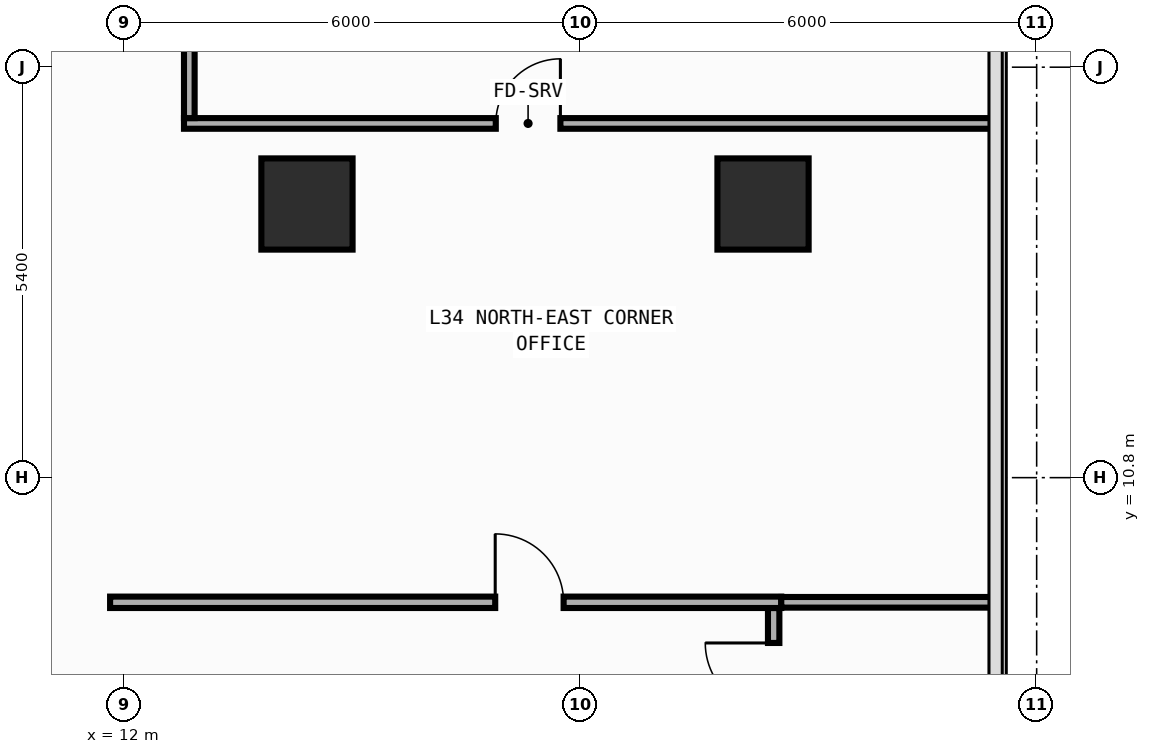
"""IFC4 building model, lengths in metres.
Left out: names, types, materials, properties, quantities, classifications, styles, units other than length and angle.
Written with IfcOpenShell. Run it as: python <this file> out.ifc"""

import sys

from ifc_helpers import new_model, si_unit, direction, frame, frame_2d, origin, origin_2d, place, context, subcontext, project, spatial, rectangle, extrude, element, fill, save


model = new_model("IFC4")
c1 = context("Model", 3, precision=1e-05, world=origin(), true_north=direction((0.0, 1.0)))
c2 = subcontext(c1, "Body", "Model", "MODEL_VIEW")
j1 = project(units=[si_unit("LENGTHUNIT", "METRE"), si_unit("PLANEANGLEUNIT", "RADIAN")], contexts=[c1])
p1 = place(None, origin())
s1 = spatial("IfcSite", under=j1, at=p1, CompositionType="ELEMENT")
p2 = place(p1, origin())
s2 = spatial("IfcBuilding", under=s1, at=p2, CompositionType="ELEMENT")
p3 = place(p2, frame((0.0, 0.0, 147.8)))
s3 = spatial("IfcBuildingStorey", under=s2, at=p3, CompositionType="ELEMENT", Elevation=147.8)
for number, where, z_axis, x_axis in (
    (1, (20.4, 14.4, 0.0), (0.0, 0.0, 1.0), (1.0, 0.0, 0.0)),
    (2, (14.4, 14.4, 0.0), (0.0, 0.0, 1.0), (1.0, 0.0, 0.0)),
):
    element("IfcColumn", number, at=place(p3, frame(where, z_axis=z_axis, x_axis=x_axis)), inside=s3, PredefinedType="COLUMN", context=c2, shape_type="SweptSolid", body=[
        extrude(rectangle(XDim=1.2, YDim=1.2, at=origin_2d()), origin(), (0.0, 0.0, 1.0), 4.2),
    ])
p4 = place(p3, frame((20.54, 7.06, 0.0), z_axis=(0.0, 0.0, 1.0), x_axis=(0.0, 1.0, 0.0)))
e3 = element("IfcWall", 3, at=p4, inside=s3, PredefinedType="PARTITIONING", context=c2, shape_type="SweptSolid", body=[
    extrude(rectangle(XDim=2.025, YDim=0.15, at=frame_2d((1.012, 0.0))), origin(), (0.0, 0.0, 1.0), 3.85),
])
p5 = place(p4, frame((0.665, 0.0, 0.0)))
e4 = element("IfcOpeningElement", 4, at=p5, cuts=e3, PredefinedType="OPENING", context=c2, shape_type="SweptSolid", body=[
    extrude(rectangle(XDim=0.9, YDim=2.15, at=frame_2d((0.45, 1.075))), frame((0.0, 0.085, 0.0), z_axis=(0.0, -1.0, 0.0), x_axis=(1.0, 0.0, 0.0)), (0.0, 0.0, 1.0), 0.17),
])
p6 = place(p3, frame((11.81, 9.16, 0.0), z_axis=(0.0, 0.0, 1.0), x_axis=(1.0, 0.0, 0.0)))
e5 = element("IfcWall", 5, at=p6, inside=s3, PredefinedType="PARTITIONING", context=c2, shape_type="SweptSolid", body=[
    extrude(rectangle(XDim=8.83, YDim=0.15, at=frame_2d((4.415, 0.0))), origin(), (0.0, 0.0, 1.0), 3.85),
])
p7 = place(p6, frame((5.067, 0.0, 0.0)))
e6 = element("IfcOpeningElement", 6, at=p7, cuts=e5, PredefinedType="OPENING", context=c2, shape_type="SweptSolid", body=[
    extrude(rectangle(XDim=0.9, YDim=2.15, at=frame_2d((0.45, 1.075))), frame((0.0, 0.085, 0.0), z_axis=(0.0, -1.0, 0.0), x_axis=(1.0, 0.0, 0.0)), (0.0, 0.0, 1.0), 0.17),
])
p8 = place(p3, frame((20.64, 9.16, 0.0), z_axis=(0.0, 0.0, 1.0), x_axis=(1.0, 0.0, 0.0)))
e7 = element("IfcWall", 7, at=p8, inside=s3, PredefinedType="PARTITIONING", context=c2, shape_type="SweptSolid", body=[
    extrude(rectangle(XDim=2.815, YDim=0.14, at=frame_2d((1.408, 0.0))), origin(), (0.0, 0.0, 1.0), 3.85),
])
p9 = place(p3, frame((12.782, 15.46, 0.0), z_axis=(0.0, 0.0, 1.0), x_axis=(1.0, 0.0, 0.0)))
e8 = element("IfcWall", 8, at=p9, inside=s3, PredefinedType="PARTITIONING", context=c2, shape_type="SweptSolid", body=[
    extrude(rectangle(XDim=10.673, YDim=0.14, at=frame_2d((5.336, 0.0))), origin(), (0.0, 0.0, 1.0), 3.85),
])
p10 = place(p9, frame((4.102, 0.0, 0.0)))
e9 = element("IfcOpeningElement", 9, at=p10, cuts=e8, PredefinedType="OPENING", context=c2, shape_type="SweptSolid", body=[
    extrude(rectangle(XDim=0.85, YDim=2.1, at=frame_2d((0.425, 1.05))), frame((0.0, 0.08, 0.0), z_axis=(0.0, -1.0, 0.0), x_axis=(1.0, 0.0, 0.0)), (0.0, 0.0, 1.0), 0.16),
])
p11 = place(p3, frame((12.852, 15.53, 0.0), z_axis=(0.0, 0.0, 1.0), x_axis=(0.0, 1.0, 0.0)))
e10 = element("IfcWall", 10, at=p11, inside=s3, PredefinedType="PARTITIONING", context=c2, shape_type="SweptSolid", body=[
    extrude(rectangle(XDim=10.625, YDim=0.14, at=frame_2d((5.312, 0.0))), origin(), (0.0, 0.0, 1.0), 3.85),
])
p12 = place(p11, frame((4.485, 0.0, 0.0)))
e11 = element("IfcOpeningElement", 11, at=p12, cuts=e10, PredefinedType="OPENING", context=c2, shape_type="SweptSolid", body=[
    extrude(rectangle(XDim=0.85, YDim=2.1, at=frame_2d((0.425, 1.05))), frame((0.0, 0.08, 0.0), z_axis=(0.0, -1.0, 0.0), x_axis=(1.0, 0.0, 0.0)), (0.0, 0.0, 1.0), 0.16),
])
p13 = place(p5, origin())
e12 = element("IfcDoor", 12, at=p13, inside=s3, OperationType="SINGLE_SWING_RIGHT", PredefinedType="DOOR", context=c2, shape_type="SweptSolid", body=[
    extrude(rectangle(XDim=0.9, YDim=2.15, at=frame_2d((0.45, 1.075))), frame((0.0, 0.025, 0.0), z_axis=(0.0, -1.0, 0.0), x_axis=(1.0, 0.0, 0.0)), (0.0, 0.0, 1.0), 0.05),
])
fill(e4, e12)
p14 = place(p7, origin())
e13 = element("IfcDoor", 13, at=p14, inside=s3, OperationType="SINGLE_SWING_LEFT", PredefinedType="DOOR", context=c2, shape_type="SweptSolid", body=[
    extrude(rectangle(XDim=0.9, YDim=2.15, at=frame_2d((0.45, 1.075))), frame((0.0, 0.025, 0.0), z_axis=(0.0, -1.0, 0.0), x_axis=(1.0, 0.0, 0.0)), (0.0, 0.0, 1.0), 0.05),
])
fill(e6, e13)
p15 = place(p10, origin())
e14 = element("IfcDoor", 14, at=p15, inside=s3, OperationType="SINGLE_SWING_RIGHT", PredefinedType="DOOR", context=c2, shape_type="SweptSolid", body=[
    extrude(rectangle(XDim=0.85, YDim=2.1, at=frame_2d((0.425, 1.05))), frame((0.0, 0.025, 0.0), z_axis=(0.0, -1.0, 0.0), x_axis=(1.0, 0.0, 0.0)), (0.0, 0.0, 1.0), 0.05),
])
fill(e9, e14)
save(model, sys.argv[1])
